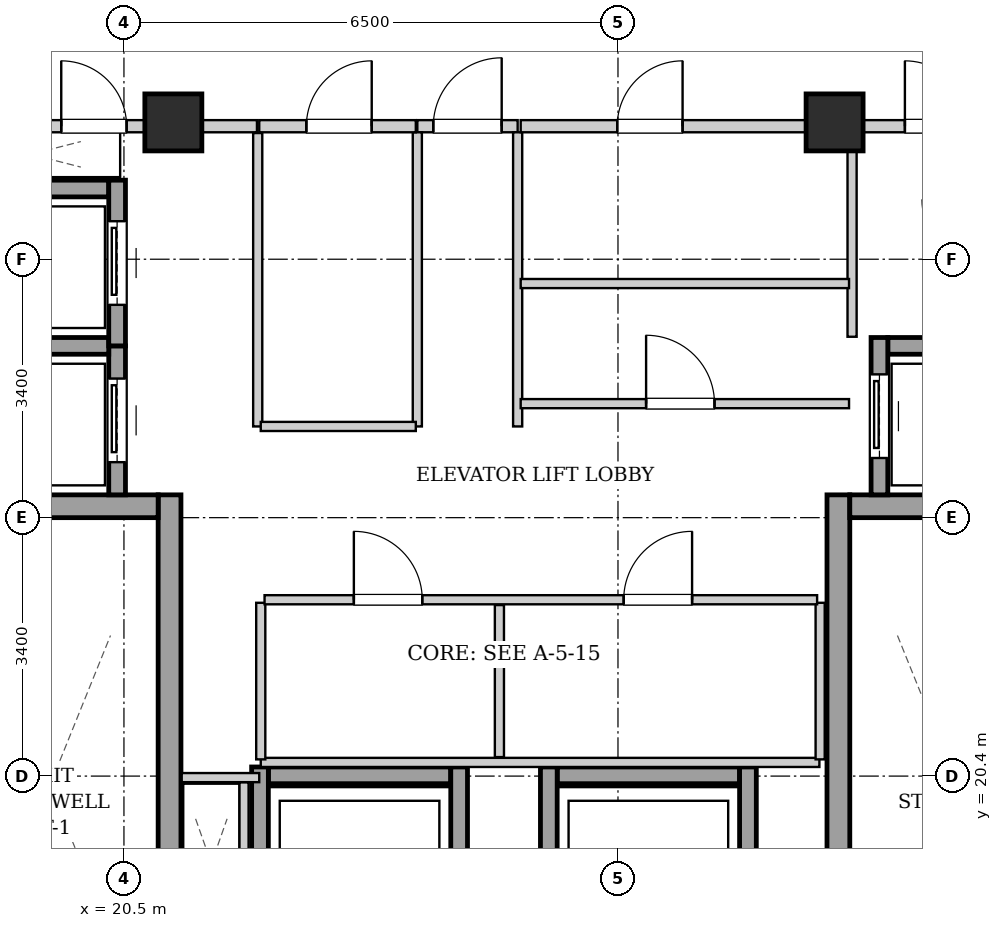
"""IFC4 building model, lengths in metres.
Left out: names, types, materials, properties, quantities, classifications, styles, units other than length and angle.
Written with IfcOpenShell. Run it as: python <this file> out.ifc"""

import sys

from ifc_helpers import new_model, si_unit, direction, frame, frame_2d, origin, origin_2d, place, context, subcontext, project, spatial, rectangle, extrude, element, fill, save


model = new_model("IFC4")
c1 = context("Model", 3, precision=1e-05, world=origin(), true_north=direction((0.0, 1.0)))
c2 = subcontext(c1, "Body", "Model", "MODEL_VIEW")
j1 = project(units=[si_unit("LENGTHUNIT", "METRE"), si_unit("PLANEANGLEUNIT", "RADIAN")], contexts=[c1])
p1 = place(None, origin())
s1 = spatial("IfcSite", under=j1, at=p1, CompositionType="ELEMENT")
p2 = place(p1, origin())
s2 = spatial("IfcBuilding", under=s1, at=p2, CompositionType="ELEMENT")
p3 = place(p2, frame((0.0, 0.0, 234.3)))
s3 = spatial("IfcBuildingStorey", under=s2, at=p3, CompositionType="ELEMENT", Elevation=234.3)
for number, where, z_axis, x_axis in (
    (1, (21.15, 29.0, 0.0), (0.0, 0.0, 1.0), (1.0, 0.0, 0.0)),
    (2, (29.85, 29.0, 0.0), (0.0, 0.0, 1.0), (1.0, 0.0, 0.0)),
):
    element("IfcColumn", number, at=place(p3, frame(where, z_axis=z_axis, x_axis=x_axis)), inside=s3, PredefinedType="COLUMN", context=c2, shape_type="SweptSolid", body=[
        extrude(rectangle(XDim=0.75, YDim=0.75, at=origin_2d()), origin(), (0.0, 0.0, 1.0), 3.4),
    ])
p4 = place(p3, frame((21.1, 15.1, 0.0), z_axis=(0.0, 0.0, 1.0), x_axis=(0.0, 1.0, 0.0)))
e3 = element("IfcWall", 3, at=p4, inside=s3, PredefinedType="SHEAR", context=c2, shape_type="SweptSolid", body=[
    extrude(rectangle(XDim=9.0, YDim=0.3, at=frame_2d((4.5, 0.0))), origin(), (0.0, 0.0, 1.0), 3.14),
])
p5 = place(p3, frame((18.1, 23.95, 0.0), z_axis=(0.0, 0.0, 1.0), x_axis=(1.0, 0.0, 0.0)))
e4 = element("IfcWall", 4, at=p5, inside=s3, PredefinedType="SHEAR", context=c2, shape_type="SweptSolid", body=[
    extrude(rectangle(XDim=2.85, YDim=0.3, at=frame_2d((1.425, 0.0))), origin(), (0.0, 0.0, 1.0), 3.14),
])
p6 = place(p3, frame((29.9, 15.1, 0.0), z_axis=(0.0, 0.0, 1.0), x_axis=(0.0, 1.0, 0.0)))
e5 = element("IfcWall", 5, at=p6, inside=s3, PredefinedType="SHEAR", context=c2, shape_type="SweptSolid", body=[
    extrude(rectangle(XDim=9.0, YDim=0.3, at=frame_2d((4.5, 0.0))), origin(), (0.0, 0.0, 1.0), 3.14),
])
p7 = place(p3, frame((30.05, 23.95, 0.0), z_axis=(0.0, 0.0, 1.0), x_axis=(1.0, 0.0, 0.0)))
e6 = element("IfcWall", 6, at=p7, inside=s3, PredefinedType="SHEAR", context=c2, shape_type="SweptSolid", body=[
    extrude(rectangle(XDim=2.85, YDim=0.3, at=frame_2d((1.425, 0.0))), origin(), (0.0, 0.0, 1.0), 3.14),
])
p8 = place(p3, frame((20.41, 24.1, 0.0), z_axis=(0.0, 0.0, 1.0), x_axis=(0.0, 1.0, 0.0)))
e7 = element("IfcWall", 7, at=p8, inside=s3, PredefinedType="SHEAR", context=c2, shape_type="SweptSolid", body=[
    extrude(rectangle(XDim=1.96, YDim=0.22, at=frame_2d((0.98, 0.0))), origin(), (0.0, 0.0, 1.0), 3.14),
])
p9 = place(p8, frame((0.43, 0.0, 0.0)))
e8 = element("IfcOpeningElement", 8, at=p9, cuts=e7, PredefinedType="OPENING", context=c2, shape_type="SweptSolid", body=[
    extrude(rectangle(XDim=1.1, YDim=2.15, at=frame_2d((0.55, 1.075))), frame((0.0, 0.12, 0.0), z_axis=(0.0, -1.0, 0.0), x_axis=(1.0, 0.0, 0.0)), (0.0, 0.0, 1.0), 0.24),
])
for number, where, z_axis, x_axis in (
    (9, (18.4, 26.06, 0.0), (0.0, 0.0, 1.0), (1.0, 0.0, 0.0)),
    (10, (18.4, 28.13, 0.0), (0.0, 0.0, 1.0), (1.0, 0.0, 0.0)),
):
    element("IfcWall", number, at=place(p3, frame(where, z_axis=z_axis, x_axis=x_axis)), inside=s3, PredefinedType="SHEAR", context=c2, shape_type="SweptSolid", body=[
        extrude(rectangle(XDim=1.9, YDim=0.22, at=frame_2d((0.95, 0.0))), origin(), (0.0, 0.0, 1.0), 3.14),
    ])
p10 = place(p3, frame((20.41, 26.06, 0.0), z_axis=(0.0, 0.0, 1.0), x_axis=(0.0, 1.0, 0.0)))
e11 = element("IfcWall", 11, at=p10, inside=s3, PredefinedType="SHEAR", context=c2, shape_type="SweptSolid", body=[
    extrude(rectangle(XDim=2.18, YDim=0.22, at=frame_2d((1.09, 0.0))), origin(), (0.0, 0.0, 1.0), 3.14),
])
p11 = place(p10, frame((0.54, 0.0, 0.0)))
e12 = element("IfcOpeningElement", 12, at=p11, cuts=e11, PredefinedType="OPENING", context=c2, shape_type="SweptSolid", body=[
    extrude(rectangle(XDim=1.1, YDim=2.15, at=frame_2d((0.55, 1.075))), frame((0.0, 0.12, 0.0), z_axis=(0.0, -1.0, 0.0), x_axis=(1.0, 0.0, 0.0)), (0.0, 0.0, 1.0), 0.24),
])
p12 = place(p3, frame((30.55, 26.06, 0.0), z_axis=(0.0, 0.0, 1.0), x_axis=(1.0, 0.0, 0.0)))
e13 = element("IfcWall", 13, at=p12, inside=s3, PredefinedType="SHEAR", context=c2, shape_type="SweptSolid", body=[
    extrude(rectangle(XDim=1.9, YDim=0.22, at=frame_2d((0.95, 0.0))), origin(), (0.0, 0.0, 1.0), 3.14),
])
p13 = place(p3, frame((30.44, 24.1, 0.0), z_axis=(0.0, 0.0, 1.0), x_axis=(0.0, 1.0, 0.0)))
e14 = element("IfcWall", 14, at=p13, inside=s3, PredefinedType="SHEAR", context=c2, shape_type="SweptSolid", body=[
    extrude(rectangle(XDim=2.07, YDim=0.22, at=frame_2d((1.035, 0.0))), origin(), (0.0, 0.0, 1.0), 3.14),
])
p14 = place(p13, frame((0.485, 0.0, 0.0)))
e15 = element("IfcOpeningElement", 15, at=p14, cuts=e14, PredefinedType="OPENING", context=c2, shape_type="SweptSolid", body=[
    extrude(rectangle(XDim=1.1, YDim=2.15, at=frame_2d((0.55, 1.075))), frame((0.0, 0.12, 0.0), z_axis=(0.0, -1.0, 0.0), x_axis=(1.0, 0.0, 0.0)), (0.0, 0.0, 1.0), 0.24),
])
p15 = place(p3, frame((22.4, 20.41, 0.0), z_axis=(0.0, 0.0, 1.0), x_axis=(1.0, 0.0, 0.0)))
e16 = element("IfcWall", 16, at=p15, inside=s3, PredefinedType="SHEAR", context=c2, shape_type="SweptSolid", body=[
    extrude(rectangle(XDim=2.4, YDim=0.22, at=frame_2d((1.2, 0.0))), origin(), (0.0, 0.0, 1.0), 3.14),
])
for number, where, z_axis, x_axis in (
    (17, (22.29, 17.98, 0.0), (0.0, 0.0, 1.0), (0.0, 1.0, 0.0)),
    (18, (24.91, 17.98, 0.0), (0.0, 0.0, 1.0), (0.0, 1.0, 0.0)),
):
    element("IfcWall", number, at=place(p3, frame(where, z_axis=z_axis, x_axis=x_axis)), inside=s3, PredefinedType="SHEAR", context=c2, shape_type="SweptSolid", body=[
        extrude(rectangle(XDim=2.54, YDim=0.22, at=frame_2d((1.27, 0.0))), origin(), (0.0, 0.0, 1.0), 3.14),
    ])
p16 = place(p3, frame((26.2, 20.41, 0.0), z_axis=(0.0, 0.0, 1.0), x_axis=(1.0, 0.0, 0.0)))
e19 = element("IfcWall", 19, at=p16, inside=s3, PredefinedType="SHEAR", context=c2, shape_type="SweptSolid", body=[
    extrude(rectangle(XDim=2.4, YDim=0.22, at=frame_2d((1.2, 0.0))), origin(), (0.0, 0.0, 1.0), 3.14),
])
for number, where, z_axis, x_axis in (
    (20, (26.09, 17.98, 0.0), (0.0, 0.0, 1.0), (0.0, 1.0, 0.0)),
    (21, (28.71, 17.98, 0.0), (0.0, 0.0, 1.0), (0.0, 1.0, 0.0)),
):
    element("IfcWall", number, at=place(p3, frame(where, z_axis=z_axis, x_axis=x_axis)), inside=s3, PredefinedType="SHEAR", context=c2, shape_type="SweptSolid", body=[
        extrude(rectangle(XDim=2.54, YDim=0.22, at=frame_2d((1.27, 0.0))), origin(), (0.0, 0.0, 1.0), 3.14),
    ])
p17 = place(p3, frame((24.36, 28.95, 0.0), z_axis=(0.0, 0.0, 1.0), x_axis=(1.0, 0.0, 0.0)))
e22 = element("IfcWall", 22, at=p17, inside=s3, PredefinedType="PARTITIONING", context=c2, shape_type="SweptSolid", body=[
    extrude(rectangle(XDim=1.32, YDim=0.16, at=frame_2d((0.66, 0.0))), origin(), (0.0, 0.0, 1.0), 2.668),
])
p18 = place(p17, frame((0.21, 0.0, 0.0)))
e23 = element("IfcOpeningElement", 23, at=p18, cuts=e22, PredefinedType="OPENING", context=c2, shape_type="SweptSolid", body=[
    extrude(rectangle(XDim=0.9, YDim=2.05, at=frame_2d((0.45, 1.025))), frame((0.0, 0.09, 0.0), z_axis=(0.0, -1.0, 0.0), x_axis=(1.0, 0.0, 0.0)), (0.0, 0.0, 1.0), 0.18),
])
p19 = place(p3, frame((17.96, 28.95, 0.0), z_axis=(0.0, 0.0, 1.0), x_axis=(1.0, 0.0, 0.0)))
e24 = element("IfcWall", 24, at=p19, inside=s3, PredefinedType="PARTITIONING", context=c2, shape_type="SweptSolid", body=[
    extrude(rectangle(XDim=4.29, YDim=0.16, at=frame_2d((2.145, 0.0))), origin(), (0.0, 0.0, 1.0), 2.668),
])
p20 = place(p19, frame((1.715, 0.0, 0.0)))
e25 = element("IfcOpeningElement", 25, at=p20, cuts=e24, PredefinedType="OPENING", context=c2, shape_type="SweptSolid", body=[
    extrude(rectangle(XDim=0.86, YDim=2.05, at=frame_2d((0.43, 1.025))), frame((0.0, 0.09, 0.0), z_axis=(0.0, -1.0, 0.0), x_axis=(1.0, 0.0, 0.0)), (0.0, 0.0, 1.0), 0.18),
])
p21 = place(p3, frame((22.08, 18.2, 0.0), z_axis=(0.0, 0.0, 1.0), x_axis=(0.0, 1.0, 0.0)))
e26 = element("IfcWall", 26, at=p21, inside=s3, PredefinedType="PARTITIONING", context=c2, shape_type="SweptSolid", body=[
    extrude(rectangle(XDim=2.12, YDim=0.12, at=frame_2d((1.06, 0.0))), origin(), (0.0, 0.0, 1.0), 3.14),
])
p22 = place(p3, frame((22.28, 20.38, 0.0), z_axis=(0.0, 0.0, 1.0), x_axis=(-1.0, 0.0, 0.0)))
e27 = element("IfcWall", 27, at=p22, inside=s3, PredefinedType="PARTITIONING", context=c2, shape_type="SweptSolid", body=[
    extrude(rectangle(XDim=1.02, YDim=0.12, at=frame_2d((0.51, 0.0))), origin(), (0.0, 0.0, 1.0), 3.14),
])
for number, where, z_axis, x_axis in (
    (28, (24.36, 25.0, 0.0), (0.0, 0.0, 1.0), (0.0, 1.0, 0.0)),
    (29, (25.68, 25.0, 0.0), (0.0, 0.0, 1.0), (0.0, 1.0, 0.0)),
):
    element("IfcWall", number, at=place(p3, frame(where, z_axis=z_axis, x_axis=x_axis)), inside=s3, PredefinedType="PARTITIONING", context=c2, shape_type="SweptSolid", body=[
        extrude(rectangle(XDim=3.87, YDim=0.12, at=frame_2d((1.935, 0.0))), origin(), (0.0, 0.0, 1.0), 3.14),
    ])
p23 = place(p3, frame((30.08, 26.18, 0.0), z_axis=(0.0, 0.0, 1.0), x_axis=(0.0, 1.0, 0.0)))
e30 = element("IfcWall", 30, at=p23, inside=s3, PredefinedType="PARTITIONING", context=c2, shape_type="SweptSolid", body=[
    extrude(rectangle(XDim=2.68, YDim=0.12, at=frame_2d((1.34, 0.0))), origin(), (0.0, 0.0, 1.0), 3.14),
])
p24 = place(p3, frame((30.08, 28.95, 0.0), z_axis=(0.0, 0.0, 1.0), x_axis=(1.0, 0.0, 0.0)))
e31 = element("IfcWall", 31, at=p24, inside=s3, PredefinedType="PARTITIONING", context=c2, shape_type="SweptSolid", body=[
    extrude(rectangle(XDim=2.96, YDim=0.16, at=frame_2d((1.48, 0.0))), origin(), (0.0, 0.0, 1.0), 3.14),
])
p25 = place(p24, frame((0.695, 0.0, 0.0)))
e32 = element("IfcOpeningElement", 32, at=p25, cuts=e31, PredefinedType="OPENING", context=c2, shape_type="SweptSolid", body=[
    extrude(rectangle(XDim=0.86, YDim=2.05, at=frame_2d((0.43, 1.025))), frame((0.0, 0.09, 0.0), z_axis=(0.0, -1.0, 0.0), x_axis=(1.0, 0.0, 0.0)), (0.0, 0.0, 1.0), 0.18),
])
p26 = place(p3, frame((22.26, 25.0, 0.0), z_axis=(0.0, 0.0, 1.0), x_axis=(0.0, 1.0, 0.0)))
e33 = element("IfcWall", 33, at=p26, inside=s3, PredefinedType="PARTITIONING", context=c2, shape_type="SweptSolid", body=[
    extrude(rectangle(XDim=3.86, YDim=0.12, at=frame_2d((1.93, 0.0))), origin(), (0.0, 0.0, 1.0), 3.14),
])
p27 = place(p3, frame((22.3, 25.0, 0.0), z_axis=(0.0, 0.0, 1.0), x_axis=(1.0, 0.0, 0.0)))
e34 = element("IfcWall", 34, at=p27, inside=s3, PredefinedType="PARTITIONING", context=c2, shape_type="SweptSolid", body=[
    extrude(rectangle(XDim=2.04, YDim=0.12, at=frame_2d((1.02, 0.0))), origin(), (0.0, 0.0, 1.0), 3.14),
])
p28 = place(p3, frame((22.28, 28.95, 0.0), z_axis=(0.0, 0.0, 1.0), x_axis=(1.0, 0.0, 0.0)))
e35 = element("IfcWall", 35, at=p28, inside=s3, PredefinedType="PARTITIONING", context=c2, shape_type="SweptSolid", body=[
    extrude(rectangle(XDim=2.06, YDim=0.16, at=frame_2d((1.03, 0.0))), origin(), (0.0, 0.0, 1.0), 2.668),
])
p29 = place(p28, frame((0.62, 0.0, 0.0)))
e36 = element("IfcOpeningElement", 36, at=p29, cuts=e35, PredefinedType="OPENING", context=c2, shape_type="SweptSolid", body=[
    extrude(rectangle(XDim=0.86, YDim=2.05, at=frame_2d((0.43, 1.025))), frame((0.0, 0.09, 0.0), z_axis=(0.0, -1.0, 0.0), x_axis=(1.0, 0.0, 0.0)), (0.0, 0.0, 1.0), 0.18),
])
p30 = place(p3, frame((25.72, 26.88, 0.0), z_axis=(0.0, 0.0, 1.0), x_axis=(1.0, 0.0, 0.0)))
e37 = element("IfcWall", 37, at=p30, inside=s3, PredefinedType="PARTITIONING", context=c2, shape_type="SweptSolid", body=[
    extrude(rectangle(XDim=4.32, YDim=0.12, at=frame_2d((2.16, 0.0))), origin(), (0.0, 0.0, 1.0), 3.14),
])
p31 = place(p3, frame((25.72, 25.3, 0.0), z_axis=(0.0, 0.0, 1.0), x_axis=(1.0, 0.0, 0.0)))
e38 = element("IfcWall", 38, at=p31, inside=s3, PredefinedType="PARTITIONING", context=c2, shape_type="SweptSolid", body=[
    extrude(rectangle(XDim=4.32, YDim=0.12, at=frame_2d((2.16, 0.0))), origin(), (0.0, 0.0, 1.0), 3.14),
])
p32 = place(p31, frame((1.65, 0.0, 0.0)))
e39 = element("IfcOpeningElement", 39, at=p32, cuts=e38, PredefinedType="OPENING", context=c2, shape_type="SweptSolid", body=[
    extrude(rectangle(XDim=0.9, YDim=2.05, at=frame_2d((0.45, 1.025))), frame((0.0, 0.07, 0.0), z_axis=(0.0, -1.0, 0.0), x_axis=(1.0, 0.0, 0.0)), (0.0, 0.0, 1.0), 0.14),
])
p33 = place(p3, frame((25.72, 28.95, 0.0), z_axis=(0.0, 0.0, 1.0), x_axis=(1.0, 0.0, 0.0)))
e40 = element("IfcWall", 40, at=p33, inside=s3, PredefinedType="PARTITIONING", context=c2, shape_type="SweptSolid", body=[
    extrude(rectangle(XDim=4.32, YDim=0.16, at=frame_2d((2.16, 0.0))), origin(), (0.0, 0.0, 1.0), 2.668),
])
p34 = place(p33, frame((1.27, 0.0, 0.0)))
e41 = element("IfcOpeningElement", 41, at=p34, cuts=e40, PredefinedType="OPENING", context=c2, shape_type="SweptSolid", body=[
    extrude(rectangle(XDim=0.86, YDim=2.05, at=frame_2d((0.43, 1.025))), frame((0.0, 0.09, 0.0), z_axis=(0.0, -1.0, 0.0), x_axis=(1.0, 0.0, 0.0)), (0.0, 0.0, 1.0), 0.18),
])
p35 = place(p3, frame((22.3, 20.58, 0.0), z_axis=(0.0, 0.0, 1.0), x_axis=(1.0, 0.0, 0.0)))
e42 = element("IfcWall", 42, at=p35, inside=s3, PredefinedType="PARTITIONING", context=c2, shape_type="SweptSolid", body=[
    extrude(rectangle(XDim=7.35, YDim=0.12, at=frame_2d((3.675, 0.0))), origin(), (0.0, 0.0, 1.0), 3.14),
])
for number, where, z_axis, x_axis in (
    (43, (22.3, 20.62, 0.0), (0.0, 0.0, 1.0), (0.0, 1.0, 0.0)),
    (44, (29.66, 20.62, 0.0), (0.0, 0.0, 1.0), (0.0, 1.0, 0.0)),
):
    element("IfcWall", number, at=place(p3, frame(where, z_axis=z_axis, x_axis=x_axis)), inside=s3, PredefinedType="PARTITIONING", context=c2, shape_type="SweptSolid", body=[
        extrude(rectangle(XDim=2.06, YDim=0.12, at=frame_2d((1.03, 0.0))), origin(), (0.0, 0.0, 1.0), 3.14),
    ])
p36 = place(p3, frame((25.44, 20.65, 0.0), z_axis=(0.0, 0.0, 1.0), x_axis=(0.0, 1.0, 0.0)))
e45 = element("IfcWall", 45, at=p36, inside=s3, PredefinedType="PARTITIONING", context=c2, shape_type="SweptSolid", body=[
    extrude(rectangle(XDim=2.0, YDim=0.12, at=frame_2d((1.0, 0.0))), origin(), (0.0, 0.0, 1.0), 3.14),
])
p37 = place(p3, frame((22.35, 22.72, 0.0), z_axis=(0.0, 0.0, 1.0), x_axis=(1.0, 0.0, 0.0)))
e46 = element("IfcWall", 46, at=p37, inside=s3, PredefinedType="PARTITIONING", context=c2, shape_type="SweptSolid", body=[
    extrude(rectangle(XDim=7.27, YDim=0.12, at=frame_2d((3.635, 0.0))), origin(), (0.0, 0.0, 1.0), 3.14),
])
p38 = place(p37, frame((1.175, 0.0, 0.0)))
e47 = element("IfcOpeningElement", 47, at=p38, cuts=e46, PredefinedType="OPENING", context=c2, shape_type="SweptSolid", body=[
    extrude(rectangle(XDim=0.9, YDim=2.05, at=frame_2d((0.45, 1.025))), frame((0.0, 0.07, 0.0), z_axis=(0.0, -1.0, 0.0), x_axis=(1.0, 0.0, 0.0)), (0.0, 0.0, 1.0), 0.14),
])
p39 = place(p37, frame((4.725, 0.0, 0.0)))
e48 = element("IfcOpeningElement", 48, at=p39, cuts=e46, PredefinedType="OPENING", context=c2, shape_type="SweptSolid", body=[
    extrude(rectangle(XDim=0.9, YDim=2.05, at=frame_2d((0.45, 1.025))), frame((0.0, 0.07, 0.0), z_axis=(0.0, -1.0, 0.0), x_axis=(1.0, 0.0, 0.0)), (0.0, 0.0, 1.0), 0.14),
])
p40 = place(p9, origin())
e49 = element("IfcDoor", 49, at=p40, inside=s3, OperationType="SLIDING_TO_LEFT", PredefinedType="DOOR", context=c2, shape_type="SweptSolid", body=[
    extrude(rectangle(XDim=1.1, YDim=2.15, at=frame_2d((0.55, 1.075))), frame((0.0, 0.025, 0.0), z_axis=(0.0, -1.0, 0.0), x_axis=(1.0, 0.0, 0.0)), (0.0, 0.0, 1.0), 0.05),
])
fill(e8, e49)
p41 = place(p11, origin())
e50 = element("IfcDoor", 50, at=p41, inside=s3, OperationType="SLIDING_TO_LEFT", PredefinedType="DOOR", context=c2, shape_type="SweptSolid", body=[
    extrude(rectangle(XDim=1.1, YDim=2.15, at=frame_2d((0.55, 1.075))), frame((0.0, 0.025, 0.0), z_axis=(0.0, -1.0, 0.0), x_axis=(1.0, 0.0, 0.0)), (0.0, 0.0, 1.0), 0.05),
])
fill(e12, e50)
p42 = place(p14, origin())
e51 = element("IfcDoor", 51, at=p42, inside=s3, OperationType="SLIDING_TO_LEFT", PredefinedType="DOOR", context=c2, shape_type="SweptSolid", body=[
    extrude(rectangle(XDim=1.1, YDim=2.15, at=frame_2d((0.55, 1.075))), frame((0.0, 0.025, 0.0), z_axis=(0.0, -1.0, 0.0), x_axis=(1.0, 0.0, 0.0)), (0.0, 0.0, 1.0), 0.05),
])
fill(e15, e51)
p43 = place(p18, origin())
e52 = element("IfcDoor", 52, at=p43, inside=s3, OperationType="SINGLE_SWING_RIGHT", PredefinedType="DOOR", context=c2, shape_type="SweptSolid", body=[
    extrude(rectangle(XDim=0.9, YDim=2.05, at=frame_2d((0.45, 1.025))), frame((0.0, 0.025, 0.0), z_axis=(0.0, -1.0, 0.0), x_axis=(1.0, 0.0, 0.0)), (0.0, 0.0, 1.0), 0.05),
])
fill(e23, e52)
p44 = place(p20, origin())
e53 = element("IfcDoor", 53, at=p44, inside=s3, OperationType="SINGLE_SWING_LEFT", PredefinedType="DOOR", context=c2, shape_type="SweptSolid", body=[
    extrude(rectangle(XDim=0.86, YDim=2.05, at=frame_2d((0.43, 1.025))), frame((0.0, 0.025, 0.0), z_axis=(0.0, -1.0, 0.0), x_axis=(1.0, 0.0, 0.0)), (0.0, 0.0, 1.0), 0.05),
])
fill(e25, e53)
p45 = place(p25, origin())
e54 = element("IfcDoor", 54, at=p45, inside=s3, OperationType="SINGLE_SWING_LEFT", PredefinedType="DOOR", context=c2, shape_type="SweptSolid", body=[
    extrude(rectangle(XDim=0.86, YDim=2.05, at=frame_2d((0.43, 1.025))), frame((0.0, 0.025, 0.0), z_axis=(0.0, -1.0, 0.0), x_axis=(1.0, 0.0, 0.0)), (0.0, 0.0, 1.0), 0.05),
])
fill(e32, e54)
p46 = place(p29, origin())
e55 = element("IfcDoor", 55, at=p46, inside=s3, OperationType="SINGLE_SWING_RIGHT", PredefinedType="DOOR", context=c2, shape_type="SweptSolid", body=[
    extrude(rectangle(XDim=0.86, YDim=2.05, at=frame_2d((0.43, 1.025))), frame((0.0, 0.025, 0.0), z_axis=(0.0, -1.0, 0.0), x_axis=(1.0, 0.0, 0.0)), (0.0, 0.0, 1.0), 0.05),
])
fill(e36, e55)
p47 = place(p32, origin())
e56 = element("IfcDoor", 56, at=p47, inside=s3, OperationType="SINGLE_SWING_LEFT", PredefinedType="DOOR", context=c2, shape_type="SweptSolid", body=[
    extrude(rectangle(XDim=0.9, YDim=2.05, at=frame_2d((0.45, 1.025))), frame((0.0, 0.025, 0.0), z_axis=(0.0, -1.0, 0.0), x_axis=(1.0, 0.0, 0.0)), (0.0, 0.0, 1.0), 0.05),
])
fill(e39, e56)
p48 = place(p34, origin())
e57 = element("IfcDoor", 57, at=p48, inside=s3, OperationType="SINGLE_SWING_RIGHT", PredefinedType="DOOR", context=c2, shape_type="SweptSolid", body=[
    extrude(rectangle(XDim=0.86, YDim=2.05, at=frame_2d((0.43, 1.025))), frame((0.0, 0.025, 0.0), z_axis=(0.0, -1.0, 0.0), x_axis=(1.0, 0.0, 0.0)), (0.0, 0.0, 1.0), 0.05),
])
fill(e41, e57)
p49 = place(p38, origin())
e58 = element("IfcDoor", 58, at=p49, inside=s3, OperationType="SINGLE_SWING_LEFT", PredefinedType="DOOR", context=c2, shape_type="SweptSolid", body=[
    extrude(rectangle(XDim=0.9, YDim=2.05, at=frame_2d((0.45, 1.025))), frame((0.0, 0.025, 0.0), z_axis=(0.0, -1.0, 0.0), x_axis=(1.0, 0.0, 0.0)), (0.0, 0.0, 1.0), 0.05),
])
fill(e47, e58)
p50 = place(p39, origin())
e59 = element("IfcDoor", 59, at=p50, inside=s3, OperationType="SINGLE_SWING_RIGHT", PredefinedType="DOOR", context=c2, shape_type="SweptSolid", body=[
    extrude(rectangle(XDim=0.9, YDim=2.05, at=frame_2d((0.45, 1.025))), frame((0.0, 0.025, 0.0), z_axis=(0.0, -1.0, 0.0), x_axis=(1.0, 0.0, 0.0)), (0.0, 0.0, 1.0), 0.05),
])
fill(e48, e59)
save(model, sys.argv[1])
